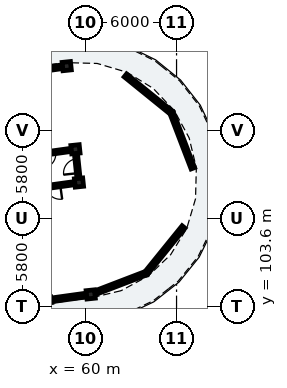
"""IFC4 building model, lengths in metres.
Left out: names, types, materials, properties, quantities, classifications, styles, units other than length and angle.
Written with IfcOpenShell. Run it as: python <this file> out.ifc"""

import sys

from ifc_helpers import new_model, si_unit, direction, frame, frame_2d, origin, origin_2d, place, context, subcontext, project, spatial, rectangle, extrude, element, fill, save


model = new_model("IFC4")
c1 = context("Model", 3, precision=1e-05, world=origin(), true_north=direction((0.0, 1.0)))
c2 = subcontext(c1, "Body", "Model", "MODEL_VIEW")
j1 = project(units=[si_unit("LENGTHUNIT", "METRE"), si_unit("PLANEANGLEUNIT", "RADIAN")], contexts=[c1])
p1 = place(None, origin())
s1 = spatial("IfcSite", under=j1, at=p1, CompositionType="ELEMENT")
p2 = place(p1, origin())
s2 = spatial("IfcBuilding", under=s1, at=p2, CompositionType="ELEMENT")
p3 = place(p2, frame((0.0, 0.0, 12.2)))
s3 = spatial("IfcBuildingStorey", under=s2, at=p3, CompositionType="ELEMENT", Elevation=12.2)
for number, where, z_axis, x_axis in (
    (1, (60.354, 104.406, 0.0), (0.0, 0.0, 1.0), (-0.105, 0.995, 0.0)),
    (2, (59.58, 111.766, 0.0), (0.0, 0.0, 1.0), (-0.105, 0.995, 0.0)),
    (3, (59.35, 113.954, 0.0), (0.0, 0.0, 1.0), (-0.105, 0.995, 0.0)),
    (4, (58.775, 119.424, 0.0), (0.0, 0.0, 1.0), (-0.105, 0.995, 0.0)),
):
    element("IfcColumn", number, at=place(p3, frame(where, z_axis=z_axis, x_axis=x_axis)), inside=s3, PredefinedType="COLUMN", context=c2, shape_type="SweptSolid", body=[
        extrude(rectangle(XDim=0.55, YDim=0.55, at=origin_2d()), origin(), (0.0, 0.0, 1.0), 3.105),
    ])
p4 = place(p3, frame((57.451, 104.004, 0.0), z_axis=(0.0, 0.0, 1.0), x_axis=(-0.169827298811, 0.985473839622, 0.0)))
e5 = element("IfcColumn", 5, at=p4, inside=s3, PredefinedType="PILASTER", context=c2, shape_type="SweptSolid", body=[
    extrude(rectangle(XDim=0.38, YDim=0.62, at=origin_2d()), origin(), (0.0, 0.0, 1.0), 3.105),
])
p5 = place(p3, frame((58.533, 119.39, 0.0), z_axis=(0.0, 0.0, 1.0), x_axis=(-0.990539718913, -0.137226328578, 0.0)))
e6 = element("IfcWall", 6, at=p5, inside=s3, PredefinedType="SOLIDWALL", context=c2, shape_type="SweptSolid", body=[
    extrude(rectangle(XDim=3.521, YDim=0.245, at=frame_2d((1.76, 0.0))), origin(), (0.0, 0.0, 1.0), 2.355),
])
p6 = place(p5, frame((1.11, 0.0, 0.55)))
e7 = element("IfcOpeningElement", 7, at=p6, cuts=e6, PredefinedType="OPENING", context=c2, shape_type="SweptSolid", body=[
    extrude(rectangle(XDim=1.3, YDim=1.6, at=frame_2d((0.65, 0.8))), frame((0.0, 0.133, 0.0), z_axis=(0.0, -1.0, 0.0), x_axis=(1.0, 0.0, 0.0)), (0.0, 0.0, 1.0), 0.265),
])
p7 = place(p3, frame((60.111, 104.373, 0.0), z_axis=(0.0, 0.0, 1.0), x_axis=(-0.990545622952, -0.13718370476, 0.0)))
e8 = element("IfcWall", 8, at=p7, inside=s3, PredefinedType="SOLIDWALL", context=c2, shape_type="SweptSolid", body=[
    extrude(rectangle(XDim=2.525, YDim=0.245, at=frame_2d((1.263, 0.0))), origin(), (0.0, 0.0, 1.0), 2.355),
])
p8 = place(p7, frame((0.438, 0.0, 0.35)))
e9 = element("IfcOpeningElement", 9, at=p8, cuts=e8, PredefinedType="OPENING", context=c2, shape_type="SweptSolid", body=[
    extrude(rectangle(XDim=1.65, YDim=1.8, at=frame_2d((0.825, 0.9))), frame((0.0, 0.133, 0.0), z_axis=(0.0, -1.0, 0.0), x_axis=(1.0, 0.0, 0.0)), (0.0, 0.0, 1.0), 0.265),
])
p9 = place(p3, frame((62.635, 118.812, 0.0), z_axis=(0.0, 0.0, 1.0), x_axis=(0.777137204109, -0.629331205321, 0.0)))
e10 = element("IfcWall", 10, at=p9, inside=s3, PredefinedType="SOLIDWALL", context=c2, shape_type="SweptSolid", body=[
    extrude(rectangle(XDim=3.908, YDim=0.245, at=frame_2d((1.954, 0.0))), origin(), (0.0, 0.0, 1.0), 2.355),
])
p10 = place(p9, frame((0.979, 0.0, 0.4)))
e11 = element("IfcOpeningElement", 11, at=p10, cuts=e10, PredefinedType="OPENING", context=c2, shape_type="SweptSolid", body=[
    extrude(rectangle(XDim=1.95, YDim=1.78, at=frame_2d((0.975, 0.89))), frame((0.0, 0.133, 0.0), z_axis=(0.0, -1.0, 0.0), x_axis=(1.0, 0.0, 0.0)), (0.0, 0.0, 1.0), 0.265),
])
p11 = place(p3, frame((65.673, 116.353, 0.0), z_axis=(0.0, 0.0, 1.0), x_axis=(0.358376224971, -0.933577249817, 0.0)))
e12 = element("IfcWall", 12, at=p11, inside=s3, PredefinedType="SOLIDWALL", context=c2, shape_type="SweptSolid", body=[
    extrude(rectangle(XDim=3.908, YDim=0.245, at=frame_2d((1.954, 0.0))), origin(), (0.0, 0.0, 1.0), 2.355),
])
p12 = place(p3, frame((66.462, 108.844, 0.0), z_axis=(0.0, 0.0, 1.0), x_axis=(-0.629331205321, -0.777137204109, 0.0)))
e13 = element("IfcWall", 13, at=p12, inside=s3, PredefinedType="SOLIDWALL", context=c2, shape_type="SweptSolid", body=[
    extrude(rectangle(XDim=3.908, YDim=0.245, at=frame_2d((1.954, 0.0))), origin(), (0.0, 0.0, 1.0), 2.355),
])
p13 = place(p12, frame((0.979, 0.0, 0.4)))
e14 = element("IfcOpeningElement", 14, at=p13, cuts=e13, PredefinedType="OPENING", context=c2, shape_type="SweptSolid", body=[
    extrude(rectangle(XDim=1.95, YDim=1.78, at=frame_2d((0.975, 0.89))), frame((0.0, 0.133, 0.0), z_axis=(0.0, -1.0, 0.0), x_axis=(1.0, 0.0, 0.0)), (0.0, 0.0, 1.0), 0.265),
])
p14 = place(p3, frame((64.002, 105.807, 0.0), z_axis=(0.0, 0.0, 1.0), x_axis=(-0.93356922619, -0.35839712598, 0.0)))
e15 = element("IfcWall", 15, at=p14, inside=s3, PredefinedType="SOLIDWALL", context=c2, shape_type="SweptSolid", body=[
    extrude(rectangle(XDim=3.908, YDim=0.245, at=frame_2d((1.954, 0.0))), origin(), (0.0, 0.0, 1.0), 2.355),
])
p15 = place(p3, frame((59.004, 113.906, 0.0), z_axis=(0.0, 0.0, 1.0), x_axis=(-0.990544162976, -0.137194246211, 0.0)))
e16 = element("IfcWall", 16, at=p15, inside=s3, PredefinedType="PARTITIONING", context=c2, shape_type="SweptSolid", body=[
    extrude(rectangle(XDim=2.863, YDim=0.205, at=frame_2d((1.432, 0.0))), origin(), (0.0, 0.0, 1.0), 2.37),
])
p16 = place(p15, frame((0.967, 0.0, 0.0)))
e17 = element("IfcOpeningElement", 17, at=p16, cuts=e16, PredefinedType="OPENING", context=c2, shape_type="SweptSolid", body=[
    extrude(rectangle(XDim=0.93, YDim=2.12, at=frame_2d((0.465, 1.06))), frame((0.0, 0.113, 0.0), z_axis=(0.0, -1.0, 0.0), x_axis=(1.0, 0.0, 0.0)), (0.0, 0.0, 1.0), 0.225),
])
p17 = place(p3, frame((59.233, 111.718, 0.0), z_axis=(0.0, 0.0, 1.0), x_axis=(-0.990535404475, -0.137257467855, 0.0)))
e18 = element("IfcWall", 18, at=p17, inside=s3, PredefinedType="PARTITIONING", context=c2, shape_type="SweptSolid", body=[
    extrude(rectangle(XDim=2.718, YDim=0.205, at=frame_2d((1.359, 0.0))), origin(), (0.0, 0.0, 1.0), 2.37),
])
p18 = place(p17, frame((0.894, 0.0, 0.0)))
e19 = element("IfcOpeningElement", 19, at=p18, cuts=e18, PredefinedType="OPENING", context=c2, shape_type="SweptSolid", body=[
    extrude(rectangle(XDim=0.93, YDim=2.12, at=frame_2d((0.465, 1.06))), frame((0.0, 0.113, 0.0), z_axis=(0.0, -1.0, 0.0), x_axis=(1.0, 0.0, 0.0)), (0.0, 0.0, 1.0), 0.225),
])
p19 = place(p3, frame((59.575, 111.816, 0.0), z_axis=(0.0, 0.0, 1.0), x_axis=(-0.104509292252, 0.994523910136, 0.0)))
e20 = element("IfcWall", 20, at=p19, inside=s3, PredefinedType="PARTITIONING", context=c2, shape_type="SweptSolid", body=[
    extrude(rectangle(XDim=2.1, YDim=0.205, at=frame_2d((1.05, 0.0))), origin(), (0.0, 0.0, 1.0), 2.37),
])
p20 = place(p19, frame((0.57, 0.0, 0.0)))
e21 = element("IfcOpeningElement", 21, at=p20, cuts=e20, PredefinedType="OPENING", context=c2, shape_type="SweptSolid", body=[
    extrude(rectangle(XDim=0.95, YDim=2.13, at=frame_2d((0.475, 1.065))), frame((0.0, 0.113, 0.0), z_axis=(0.0, -1.0, 0.0), x_axis=(1.0, 0.0, 0.0)), (0.0, 0.0, 1.0), 0.225),
])
p21 = place(p8, origin())
e22 = element("IfcWindow", 22, at=p21, inside=s3, PartitioningType="SINGLE_PANEL", PredefinedType="WINDOW", context=c2, shape_type="SweptSolid", body=[
    extrude(rectangle(XDim=1.65, YDim=1.8, at=frame_2d((0.825, 0.9))), frame((0.0, 0.03, 0.0), z_axis=(0.0, -1.0, 0.0), x_axis=(1.0, 0.0, 0.0)), (0.0, 0.0, 1.0), 0.06),
])
fill(e9, e22)
p22 = place(p10, origin())
e23 = element("IfcWindow", 23, at=p22, inside=s3, PartitioningType="SINGLE_PANEL", PredefinedType="WINDOW", context=c2, shape_type="SweptSolid", body=[
    extrude(rectangle(XDim=1.95, YDim=1.78, at=frame_2d((0.975, 0.89))), frame((0.0, 0.03, 0.0), z_axis=(0.0, -1.0, 0.0), x_axis=(1.0, 0.0, 0.0)), (0.0, 0.0, 1.0), 0.06),
])
fill(e11, e23)
p23 = place(p13, origin())
e24 = element("IfcWindow", 24, at=p23, inside=s3, PartitioningType="SINGLE_PANEL", PredefinedType="WINDOW", context=c2, shape_type="SweptSolid", body=[
    extrude(rectangle(XDim=1.95, YDim=1.78, at=frame_2d((0.975, 0.89))), frame((0.0, 0.03, 0.0), z_axis=(0.0, -1.0, 0.0), x_axis=(1.0, 0.0, 0.0)), (0.0, 0.0, 1.0), 0.06),
])
fill(e14, e24)
p24 = place(p16, origin())
e25 = element("IfcDoor", 25, at=p24, inside=s3, OperationType="SINGLE_SWING_RIGHT", PredefinedType="DOOR", context=c2, shape_type="SweptSolid", body=[
    extrude(rectangle(XDim=0.93, YDim=2.12, at=frame_2d((0.465, 1.06))), frame((0.0, 0.025, 0.0), z_axis=(0.0, -1.0, 0.0), x_axis=(1.0, 0.0, 0.0)), (0.0, 0.0, 1.0), 0.05),
])
fill(e17, e25)
p25 = place(p18, origin())
e26 = element("IfcDoor", 26, at=p25, inside=s3, OperationType="SINGLE_SWING_LEFT", PredefinedType="DOOR", context=c2, shape_type="SweptSolid", body=[
    extrude(rectangle(XDim=0.93, YDim=2.12, at=frame_2d((0.465, 1.06))), frame((0.0, 0.025, 0.0), z_axis=(0.0, -1.0, 0.0), x_axis=(1.0, 0.0, 0.0)), (0.0, 0.0, 1.0), 0.05),
])
fill(e19, e26)
p26 = place(p20, origin())
e27 = element("IfcDoor", 27, at=p26, inside=s3, OperationType="SINGLE_SWING_LEFT", PredefinedType="DOOR", context=c2, shape_type="SweptSolid", body=[
    extrude(rectangle(XDim=0.95, YDim=2.13, at=frame_2d((0.475, 1.065))), frame((0.0, 0.025, 0.0), z_axis=(0.0, -1.0, 0.0), x_axis=(1.0, 0.0, 0.0)), (0.0, 0.0, 1.0), 0.05),
])
fill(e21, e27)
save(model, sys.argv[1])
